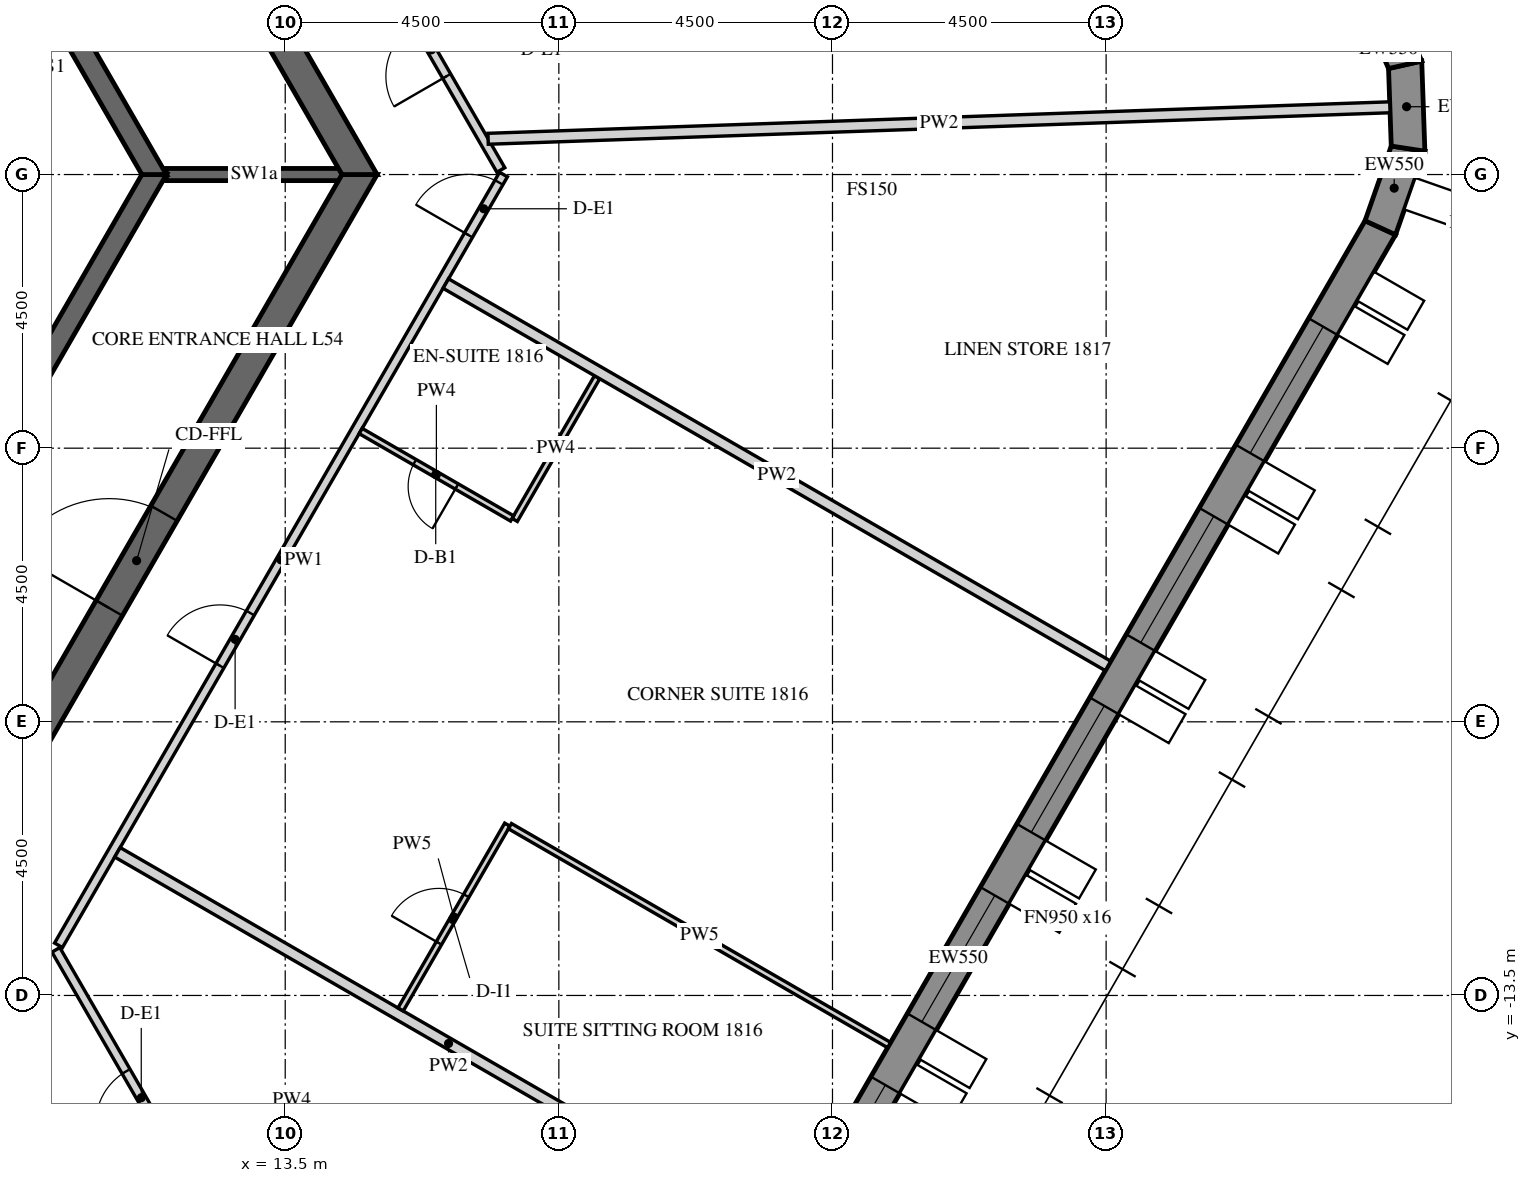
"""IFC4 building model, lengths in metres.
Left out: names, types, materials, properties, quantities, classifications, styles, units other than length and angle.
Written with IfcOpenShell. Run it as: python <this file> out.ifc"""

import sys

from ifc_helpers import new_model, si_unit, direction, frame, frame_2d, origin, place, context, subcontext, project, spatial, polyline, rectangle, outline, extrude, element, fill, save


model = new_model("IFC4")
c1 = context("Model", 3, precision=1e-05, world=origin(), true_north=direction((0.0, 1.0)))
c2 = subcontext(c1, "Body", "Model", "MODEL_VIEW")
j1 = project(units=[si_unit("LENGTHUNIT", "METRE"), si_unit("PLANEANGLEUNIT", "RADIAN")], contexts=[c1])
p1 = place(None, origin())
s1 = spatial("IfcSite", under=j1, at=p1, CompositionType="ELEMENT")
p2 = place(p1, origin())
s2 = spatial("IfcBuilding", under=s1, at=p2, CompositionType="ELEMENT")
p3 = place(p2, frame((0.0, 0.0, 226.8)))
s3 = spatial("IfcBuildingStorey", under=s2, at=p3, CompositionType="ELEMENT", Elevation=226.8)
p4 = place(p3, frame((17.63, -24.914, -0.15), z_axis=(0.0, 0.0, 1.0), x_axis=(0.499998569178, 0.866026229868, 0.0)))
e1 = element("IfcWall", 1, at=p4, inside=s3, PredefinedType="SOLIDWALL", context=c2, shape_type="SweptSolid", body=[
    extrude(outline(polyline([(-0.022, -0.275), (27.783, -0.275), (27.732, 0.275), (0.022, 0.275), (-0.022, -0.275)])), origin(), (0.0, 0.0, 1.0), 3.9),
])
p5 = place(p4, frame((1.879, 0.0, 1.05)))
e2 = element("IfcOpeningElement", 2, at=p5, cuts=e1, PredefinedType="OPENING", context=c2, shape_type="SweptSolid", body=[
    extrude(rectangle(XDim=2.4, YDim=2.4, at=frame_2d((1.2, 1.2))), frame((0.0, 0.285, 0.0), z_axis=(0.0, -1.0, 0.0), x_axis=(1.0, 0.0, 0.0)), (0.0, 0.0, 1.0), 0.57),
])
p6 = place(p4, frame((5.479, 0.0, 1.05)))
e3 = element("IfcOpeningElement", 3, at=p6, cuts=e1, PredefinedType="OPENING", context=c2, shape_type="SweptSolid", body=[
    extrude(rectangle(XDim=2.4, YDim=2.4, at=frame_2d((1.2, 1.2))), frame((0.0, 0.285, 0.0), z_axis=(0.0, -1.0, 0.0), x_axis=(1.0, 0.0, 0.0)), (0.0, 0.0, 1.0), 0.57),
])
p7 = place(p4, frame((9.079, 0.0, 1.05)))
e4 = element("IfcOpeningElement", 4, at=p7, cuts=e1, PredefinedType="OPENING", context=c2, shape_type="SweptSolid", body=[
    extrude(rectangle(XDim=2.4, YDim=2.4, at=frame_2d((1.2, 1.2))), frame((0.0, 0.285, 0.0), z_axis=(0.0, -1.0, 0.0), x_axis=(1.0, 0.0, 0.0)), (0.0, 0.0, 1.0), 0.57),
])
p8 = place(p4, frame((12.679, 0.0, 1.05)))
e5 = element("IfcOpeningElement", 5, at=p8, cuts=e1, PredefinedType="OPENING", context=c2, shape_type="SweptSolid", body=[
    extrude(rectangle(XDim=2.4, YDim=2.4, at=frame_2d((1.2, 1.2))), frame((0.0, 0.285, 0.0), z_axis=(0.0, -1.0, 0.0), x_axis=(1.0, 0.0, 0.0)), (0.0, 0.0, 1.0), 0.57),
])
p9 = place(p4, frame((16.279, 0.0, 1.05)))
e6 = element("IfcOpeningElement", 6, at=p9, cuts=e1, PredefinedType="OPENING", context=c2, shape_type="SweptSolid", body=[
    extrude(rectangle(XDim=2.4, YDim=2.4, at=frame_2d((1.2, 1.2))), frame((0.0, 0.285, 0.0), z_axis=(0.0, -1.0, 0.0), x_axis=(1.0, 0.0, 0.0)), (0.0, 0.0, 1.0), 0.57),
])
p10 = place(p4, frame((19.879, 0.0, 1.05)))
e7 = element("IfcOpeningElement", 7, at=p10, cuts=e1, PredefinedType="OPENING", context=c2, shape_type="SweptSolid", body=[
    extrude(rectangle(XDim=2.4, YDim=2.4, at=frame_2d((1.2, 1.2))), frame((0.0, 0.285, 0.0), z_axis=(0.0, -1.0, 0.0), x_axis=(1.0, 0.0, 0.0)), (0.0, 0.0, 1.0), 0.57),
])
p11 = place(p4, frame((23.479, 0.0, 1.05)))
e8 = element("IfcOpeningElement", 8, at=p11, cuts=e1, PredefinedType="OPENING", context=c2, shape_type="SweptSolid", body=[
    extrude(rectangle(XDim=2.4, YDim=2.4, at=frame_2d((1.2, 1.2))), frame((0.0, 0.285, 0.0), z_axis=(0.0, -1.0, 0.0), x_axis=(1.0, 0.0, 0.0)), (0.0, 0.0, 1.0), 0.57),
])
p12 = place(p3, frame((31.509, -0.875, -0.15), z_axis=(0.0, 0.0, 1.0), x_axis=(0.33111537203, 0.943590276765, 0.0)))
e9 = element("IfcWall", 9, at=p12, inside=s3, PredefinedType="SOLIDWALL", context=c2, shape_type="SweptSolid", body=[
    extrude(outline(polyline([(-0.026, -0.275), (1.431, -0.275), (1.327, 0.275), (0.026, 0.275), (-0.026, -0.275)])), origin(), (0.0, 0.0, 1.0), 3.9),
])
p13 = place(p3, frame((31.966, 0.426, -0.15), z_axis=(0.0, 0.0, 1.0), x_axis=(-0.034876908462, 0.999391615562, 0.0)))
e10 = element("IfcWall", 10, at=p13, inside=s3, PredefinedType="SOLIDWALL", context=c2, shape_type="SweptSolid", body=[
    extrude(outline(polyline([(-0.052, -0.275), (1.431, -0.275), (1.327, 0.275), (0.052, 0.275), (-0.052, -0.275)])), origin(), (0.0, 0.0, 1.0), 3.9),
])
p14 = place(p3, frame((31.917, 1.804, -0.15), z_axis=(0.0, 0.0, 1.0), x_axis=(-0.396225741392, 0.918153125496, 0.0)))
e11 = element("IfcWall", 11, at=p14, inside=s3, PredefinedType="SOLIDWALL", context=c2, shape_type="SweptSolid", body=[
    extrude(outline(polyline([(-0.052, -0.275), (1.405, -0.275), (1.353, 0.275), (0.052, 0.275), (-0.052, -0.275)])), origin(), (0.0, 0.0, 1.0), 3.9),
])
p15 = place(p3, frame((7.361, -12.75, -0.15), z_axis=(0.0, 0.0, 1.0), x_axis=(0.50000571537, 0.866022103989, 0.0)))
e12 = element("IfcWall", 12, at=p15, inside=s3, PredefinedType="SHEAR", context=c2, shape_type="SweptSolid", body=[
    extrude(outline(polyline([(-0.144, -0.25), (14.867, -0.25), (14.578, 0.25), (0.144, 0.25), (-0.144, -0.25)])), origin(), (0.0, 0.0, 1.0), 3.9),
])
p16 = place(p15, frame((6.49, 0.0, 0.15)))
e13 = element("IfcOpeningElement", 13, at=p16, cuts=e12, PredefinedType="OPENING", context=c2, shape_type="SweptSolid", body=[
    extrude(rectangle(XDim=1.8, YDim=2.4, at=frame_2d((0.9, 1.2))), frame((0.0, 0.26, 0.0), z_axis=(0.0, -1.0, 0.0), x_axis=(1.0, 0.0, 0.0)), (0.0, 0.0, 1.0), 0.52),
])
p17 = place(p3, frame((14.722, 0.0, -0.15), z_axis=(0.0, 0.0, 1.0), x_axis=(-0.50000571537, 0.866022103989, 0.0)))
e14 = element("IfcWall", 14, at=p17, inside=s3, PredefinedType="SHEAR", context=c2, shape_type="SweptSolid", body=[
    extrude(outline(polyline([(-0.144, -0.25), (14.867, -0.25), (14.578, 0.25), (0.144, 0.25), (-0.144, -0.25)])), origin(), (0.0, 0.0, 1.0), 3.9),
])
p18 = place(p17, frame((6.432, 0.0, 0.15)))
e15 = element("IfcOpeningElement", 15, at=p18, cuts=e14, PredefinedType="OPENING", context=c2, shape_type="SweptSolid", body=[
    extrude(rectangle(XDim=1.8, YDim=2.4, at=frame_2d((0.9, 1.2))), frame((0.0, 0.26, 0.0), z_axis=(0.0, -1.0, 0.0), x_axis=(1.0, 0.0, 0.0)), (0.0, 0.0, 1.0), 0.52),
])
p19 = place(p3, frame((7.506, -13.0, -0.15), z_axis=(0.0, 0.0, 1.0), x_axis=(0.499988271576, -0.866032175087, 0.0)))
e16 = element("IfcWall", 16, at=p19, inside=s3, PredefinedType="SHEAR", context=c2, shape_type="SweptSolid", body=[
    extrude(rectangle(XDim=15.424, YDim=0.5, at=frame_2d((7.712, 0.0))), origin(), (0.0, 0.0, 1.0), 3.9),
])
p20 = place(p19, frame((6.812, 0.0, 0.15)))
e17 = element("IfcOpeningElement", 17, at=p20, cuts=e16, PredefinedType="OPENING", context=c2, shape_type="SweptSolid", body=[
    extrude(rectangle(XDim=1.8, YDim=2.4, at=frame_2d((0.9, 1.2))), frame((0.0, 0.26, 0.0), z_axis=(0.0, -1.0, 0.0), x_axis=(1.0, 0.0, 0.0)), (0.0, 0.0, 1.0), 0.52),
])
p21 = place(p3, frame((5.673, -9.825, -0.15), z_axis=(0.0, 0.0, 1.0), x_axis=(0.499995046907, 0.866028263435, 0.0)))
e18 = element("IfcWall", 18, at=p21, inside=s3, PredefinedType="SHEAR", context=c2, shape_type="SweptSolid", body=[
    extrude(outline(polyline([(-0.101, -0.175), (11.446, -0.175), (11.244, 0.175), (0.101, 0.175), (-0.101, -0.175)])), origin(), (0.0, 0.0, 1.0), 3.9),
])
p22 = place(p21, frame((4.801, 0.0, 0.15)))
e19 = element("IfcOpeningElement", 19, at=p22, cuts=e18, PredefinedType="OPENING", context=c2, shape_type="SweptSolid", body=[
    extrude(rectangle(XDim=1.8, YDim=2.4, at=frame_2d((0.9, 1.2))), frame((0.0, 0.185, 0.0), z_axis=(0.0, -1.0, 0.0), x_axis=(1.0, 0.0, 0.0)), (0.0, 0.0, 1.0), 0.37),
])
p23 = place(p3, frame((11.345, 0.0, -0.15), z_axis=(0.0, 0.0, 1.0), x_axis=(-0.499995046907, 0.866028263435, 0.0)))
e20 = element("IfcWall", 20, at=p23, inside=s3, PredefinedType="SHEAR", context=c2, shape_type="SweptSolid", body=[
    extrude(outline(polyline([(-0.101, -0.175), (11.446, -0.175), (11.244, 0.175), (0.101, 0.175), (-0.101, -0.175)])), origin(), (0.0, 0.0, 1.0), 3.9),
])
p24 = place(p23, frame((4.744, 0.0, 0.15)))
e21 = element("IfcOpeningElement", 21, at=p24, cuts=e20, PredefinedType="OPENING", context=c2, shape_type="SweptSolid", body=[
    extrude(rectangle(XDim=1.8, YDim=2.4, at=frame_2d((0.9, 1.2))), frame((0.0, 0.185, 0.0), z_axis=(0.0, -1.0, 0.0), x_axis=(1.0, 0.0, 0.0)), (0.0, 0.0, 1.0), 0.37),
])
p25 = place(p3, frame((11.547, 0.0, -0.15), z_axis=(0.0, 0.0, 1.0), x_axis=(1.0, 0.0, 0.0)))
e22 = element("IfcWall", 22, at=p25, inside=s3, PredefinedType="SHEAR", context=c2, shape_type="SweptSolid", body=[
    extrude(rectangle(XDim=2.887, YDim=0.2, at=frame_2d((1.443, 0.0))), origin(), (0.0, 0.0, 1.0), 3.9),
])
p26 = place(p3, frame((6.221, -14.875, 0.0), z_axis=(0.0, 0.0, 1.0), x_axis=(0.499989830942, -0.866031274813, 0.0)))
e23 = element("IfcWall", 23, at=p26, inside=s3, PredefinedType="PARTITIONING", context=c2, shape_type="SweptSolid", body=[
    extrude(rectangle(XDim=7.93, YDim=0.15, at=frame_2d((3.965, 0.0))), origin(), (0.0, 0.0, 1.0), 2.988),
])
p27 = place(p26, frame((2.552, 0.0, 0.0)))
e24 = element("IfcOpeningElement", 24, at=p27, cuts=e23, PredefinedType="OPENING", context=c2, shape_type="SweptSolid", body=[
    extrude(rectangle(XDim=1.0, YDim=2.1, at=frame_2d((0.5, 1.05))), frame((0.0, 0.085, 0.0), z_axis=(0.0, -1.0, 0.0), x_axis=(1.0, 0.0, 0.0)), (0.0, 0.0, 1.0), 0.17),
])
p28 = place(p3, frame((13.699, -19.628, 0.0), z_axis=(0.0, 0.0, 1.0), x_axis=(-0.499997422768, 0.866026891745, 0.0)))
e25 = element("IfcWall", 25, at=p28, inside=s3, PredefinedType="PARTITIONING", context=c2, shape_type="SweptSolid", body=[
    extrude(rectangle(XDim=7.942, YDim=0.15, at=frame_2d((3.971, 0.0))), origin(), (0.0, 0.0, 1.0), 2.988),
])
p29 = place(p28, frame((4.634, 0.0, 0.0)))
e26 = element("IfcOpeningElement", 26, at=p29, cuts=e25, PredefinedType="OPENING", context=c2, shape_type="SweptSolid", body=[
    extrude(rectangle(XDim=1.0, YDim=2.1, at=frame_2d((0.5, 1.05))), frame((0.0, 0.085, 0.0), z_axis=(0.0, -1.0, 0.0), x_axis=(1.0, 0.0, 0.0)), (0.0, 0.0, 1.0), 0.17),
])
p30 = place(p3, frame((9.772, -12.675, 0.0), z_axis=(0.0, 0.0, 1.0), x_axis=(0.499996322767, 0.866027526826, 0.0)))
e27 = element("IfcWall", 27, at=p30, inside=s3, PredefinedType="PARTITIONING", context=c2, shape_type="SweptSolid", body=[
    extrude(rectangle(XDim=14.636, YDim=0.15, at=frame_2d((7.318, 0.0))), origin(), (0.0, 0.0, 1.0), 2.988),
])
p31 = place(p30, frame((5.309, 0.0, 0.0)))
e28 = element("IfcOpeningElement", 28, at=p31, cuts=e27, PredefinedType="OPENING", context=c2, shape_type="SweptSolid", body=[
    extrude(rectangle(XDim=1.0, YDim=2.1, at=frame_2d((0.5, 1.05))), frame((0.0, 0.085, 0.0), z_axis=(0.0, -1.0, 0.0), x_axis=(1.0, 0.0, 0.0)), (0.0, 0.0, 1.0), 0.17),
])
p32 = place(p30, frame((13.486, 0.0, 0.0)))
e29 = element("IfcOpeningElement", 29, at=p32, cuts=e27, PredefinedType="OPENING", context=c2, shape_type="SweptSolid", body=[
    extrude(rectangle(XDim=1.0, YDim=2.1, at=frame_2d((0.5, 1.05))), frame((0.0, 0.085, 0.0), z_axis=(0.0, -1.0, 0.0), x_axis=(1.0, 0.0, 0.0)), (0.0, 0.0, 1.0), 0.17),
])
p33 = place(p3, frame((17.046, 0.075, 0.0), z_axis=(0.0, 0.0, 1.0), x_axis=(-0.499996322767, 0.866027526826, 0.0)))
e30 = element("IfcWall", 30, at=p33, inside=s3, PredefinedType="PARTITIONING", context=c2, shape_type="SweptSolid", body=[
    extrude(rectangle(XDim=14.636, YDim=0.15, at=frame_2d((7.318, 0.0))), origin(), (0.0, 0.0, 1.0), 2.988),
])
p34 = place(p33, frame((1.781, 0.0, 0.0)))
e31 = element("IfcOpeningElement", 31, at=p34, cuts=e30, PredefinedType="OPENING", context=c2, shape_type="SweptSolid", body=[
    extrude(rectangle(XDim=1.0, YDim=2.1, at=frame_2d((0.5, 1.05))), frame((0.0, 0.085, 0.0), z_axis=(0.0, -1.0, 0.0), x_axis=(1.0, 0.0, 0.0)), (0.0, 0.0, 1.0), 0.17),
])
p35 = place(p33, frame((7.872, 0.0, 0.0)))
e32 = element("IfcOpeningElement", 32, at=p35, cuts=e30, PredefinedType="OPENING", context=c2, shape_type="SweptSolid", body=[
    extrude(rectangle(XDim=1.0, YDim=2.1, at=frame_2d((0.5, 1.05))), frame((0.0, 0.085, 0.0), z_axis=(0.0, -1.0, 0.0), x_axis=(1.0, 0.0, 0.0)), (0.0, 0.0, 1.0), 0.17),
])
p36 = place(p33, frame((13.203, 0.0, 0.0)))
e33 = element("IfcOpeningElement", 33, at=p36, cuts=e30, PredefinedType="OPENING", context=c2, shape_type="SweptSolid", body=[
    extrude(rectangle(XDim=1.0, YDim=2.1, at=frame_2d((0.5, 1.05))), frame((0.0, 0.085, 0.0), z_axis=(0.0, -1.0, 0.0), x_axis=(1.0, 0.0, 0.0)), (0.0, 0.0, 1.0), 0.17),
])
p37 = place(p3, frame((21.631, -17.433, 0.0), z_axis=(0.0, 0.0, 1.0), x_axis=(-0.866032662629, 0.499987427101, 0.0)))
e34 = element("IfcWall", 34, at=p37, inside=s3, PredefinedType="PARTITIONING", context=c2, shape_type="SweptSolid", body=[
    extrude(rectangle(XDim=12.575, YDim=0.18, at=frame_2d((6.288, 0.0))), origin(), (0.0, 0.0, 1.0), 2.988),
])
p38 = place(p3, frame((18.629, -3.333, 0.0), z_axis=(0.0, 0.0, 1.0), x_axis=(-0.499995396135, -0.866028061811, 0.0)))
e35 = element("IfcWall", 35, at=p38, inside=s3, PredefinedType="PARTITIONING", context=c2, shape_type="SweptSolid", body=[
    extrude(rectangle(XDim=2.71, YDim=0.1, at=frame_2d((1.355, 0.0))), origin(), (0.0, 0.0, 1.0), 2.988),
])
p39 = place(p3, frame((17.231, -5.655, 0.0), z_axis=(0.0, 0.0, 1.0), x_axis=(-0.866039941686, 0.499974818771, 0.0)))
e36 = element("IfcWall", 36, at=p39, inside=s3, PredefinedType="PARTITIONING", context=c2, shape_type="SweptSolid", body=[
    extrude(rectangle(XDim=2.875, YDim=0.1, at=frame_2d((1.438, 0.0))), origin(), (0.0, 0.0, 1.0), 2.988),
])
p40 = place(p39, frame((1.05, 0.0, 0.0)))
e37 = element("IfcOpeningElement", 37, at=p40, cuts=e36, PredefinedType="OPENING", context=c2, shape_type="SweptSolid", body=[
    extrude(rectangle(XDim=0.8, YDim=2.1, at=frame_2d((0.4, 1.05))), frame((0.0, 0.06, 0.0), z_axis=(0.0, -1.0, 0.0), x_axis=(1.0, 0.0, 0.0)), (0.0, 0.0, 1.0), 0.12),
])
p41 = place(p3, frame((15.398, -13.73, 0.0), z_axis=(0.0, 0.0, 1.0), x_axis=(0.499969314921, 0.866043119098, 0.0)))
e38 = element("IfcWall", 38, at=p41, inside=s3, PredefinedType="PARTITIONING", context=c2, shape_type="SweptSolid", body=[
    extrude(rectangle(XDim=3.51, YDim=0.1, at=frame_2d((1.755, 0.0))), origin(), (0.0, 0.0, 1.0), 2.988),
])
p42 = place(p41, frame((1.26, 0.0, 0.0)))
e39 = element("IfcOpeningElement", 39, at=p42, cuts=e38, PredefinedType="OPENING", context=c2, shape_type="SweptSolid", body=[
    extrude(rectangle(XDim=0.9, YDim=2.1, at=frame_2d((0.45, 1.05))), frame((0.0, 0.06, 0.0), z_axis=(0.0, -1.0, 0.0), x_axis=(1.0, 0.0, 0.0)), (0.0, 0.0, 1.0), 0.12),
])
p43 = place(p3, frame((17.196, -10.716, 0.0), z_axis=(0.0, 0.0, 1.0), x_axis=(0.866033125095, -0.499986626058, 0.0)))
e40 = element("IfcWall", 40, at=p43, inside=s3, PredefinedType="PARTITIONING", context=c2, shape_type="SweptSolid", body=[
    extrude(rectangle(XDim=7.2, YDim=0.1, at=frame_2d((3.6, 0.0))), origin(), (0.0, 0.0, 1.0), 2.988),
])
p44 = place(p3, frame((27.031, -8.08, 0.0), z_axis=(0.0, 0.0, 1.0), x_axis=(-0.86602780907, 0.499995833901, 0.0)))
e41 = element("IfcWall", 41, at=p44, inside=s3, PredefinedType="PARTITIONING", context=c2, shape_type="SweptSolid", body=[
    extrude(rectangle(XDim=12.575, YDim=0.18, at=frame_2d((6.287, 0.0))), origin(), (0.0, 0.0, 1.0), 2.988),
])
p45 = place(p3, frame((31.667, 1.106, 0.0), z_axis=(0.0, 0.0, 1.0), x_axis=(-0.999390937365, -0.034896336667, 0.0)))
e42 = element("IfcWall", 42, at=p45, inside=s3, PredefinedType="PARTITIONING", context=c2, shape_type="SweptSolid", body=[
    extrude(rectangle(XDim=14.839, YDim=0.18, at=frame_2d((7.419, 0.0))), origin(), (0.0, 0.0, 1.0), 2.988),
])
p46 = place(p7, frame((0.0, 0.205, 0.0)))
e43 = element("IfcWindow", 43, at=p46, inside=s3, PartitioningType="DOUBLE_PANEL_VERTICAL", PredefinedType="WINDOW", context=c2, shape_type="SweptSolid", body=[
    extrude(rectangle(XDim=2.4, YDim=2.4, at=frame_2d((1.2, 1.2))), frame((0.0, 0.03, 0.0), z_axis=(0.0, -1.0, 0.0), x_axis=(1.0, 0.0, 0.0)), (0.0, 0.0, 1.0), 0.06),
])
fill(e4, e43)
p47 = place(p8, frame((0.0, 0.205, 0.0)))
e44 = element("IfcWindow", 44, at=p47, inside=s3, PartitioningType="DOUBLE_PANEL_VERTICAL", PredefinedType="WINDOW", context=c2, shape_type="SweptSolid", body=[
    extrude(rectangle(XDim=2.4, YDim=2.4, at=frame_2d((1.2, 1.2))), frame((0.0, 0.03, 0.0), z_axis=(0.0, -1.0, 0.0), x_axis=(1.0, 0.0, 0.0)), (0.0, 0.0, 1.0), 0.06),
])
fill(e5, e44)
p48 = place(p9, frame((0.0, 0.205, 0.0)))
e45 = element("IfcWindow", 45, at=p48, inside=s3, PartitioningType="DOUBLE_PANEL_VERTICAL", PredefinedType="WINDOW", context=c2, shape_type="SweptSolid", body=[
    extrude(rectangle(XDim=2.4, YDim=2.4, at=frame_2d((1.2, 1.2))), frame((0.0, 0.03, 0.0), z_axis=(0.0, -1.0, 0.0), x_axis=(1.0, 0.0, 0.0)), (0.0, 0.0, 1.0), 0.06),
])
fill(e6, e45)
p49 = place(p10, frame((0.0, 0.205, 0.0)))
e46 = element("IfcWindow", 46, at=p49, inside=s3, PartitioningType="DOUBLE_PANEL_VERTICAL", PredefinedType="WINDOW", context=c2, shape_type="SweptSolid", body=[
    extrude(rectangle(XDim=2.4, YDim=2.4, at=frame_2d((1.2, 1.2))), frame((0.0, 0.03, 0.0), z_axis=(0.0, -1.0, 0.0), x_axis=(1.0, 0.0, 0.0)), (0.0, 0.0, 1.0), 0.06),
])
fill(e7, e46)
p50 = place(p11, frame((0.0, 0.205, 0.0)))
e47 = element("IfcWindow", 47, at=p50, inside=s3, PartitioningType="DOUBLE_PANEL_VERTICAL", PredefinedType="WINDOW", context=c2, shape_type="SweptSolid", body=[
    extrude(rectangle(XDim=2.4, YDim=2.4, at=frame_2d((1.2, 1.2))), frame((0.0, 0.03, 0.0), z_axis=(0.0, -1.0, 0.0), x_axis=(1.0, 0.0, 0.0)), (0.0, 0.0, 1.0), 0.06),
])
fill(e8, e47)
p51 = place(p16, origin())
e48 = element("IfcDoor", 48, at=p51, inside=s3, OperationType="DOUBLE_DOOR_SINGLE_SWING", PredefinedType="DOOR", context=c2, shape_type="SweptSolid", body=[
    extrude(rectangle(XDim=1.8, YDim=2.4, at=frame_2d((0.9, 1.2))), frame((0.0, 0.025, 0.0), z_axis=(0.0, -1.0, 0.0), x_axis=(1.0, 0.0, 0.0)), (0.0, 0.0, 1.0), 0.05),
])
fill(e13, e48)
p52 = place(p29, origin())
e49 = element("IfcDoor", 49, at=p52, inside=s3, OperationType="SINGLE_SWING_LEFT", PredefinedType="DOOR", context=c2, shape_type="SweptSolid", body=[
    extrude(rectangle(XDim=1.0, YDim=2.1, at=frame_2d((0.5, 1.05))), frame((0.0, 0.025, 0.0), z_axis=(0.0, -1.0, 0.0), x_axis=(1.0, 0.0, 0.0)), (0.0, 0.0, 1.0), 0.05),
])
fill(e26, e49)
p53 = place(p31, origin())
e50 = element("IfcDoor", 50, at=p53, inside=s3, OperationType="SINGLE_SWING_LEFT", PredefinedType="DOOR", context=c2, shape_type="SweptSolid", body=[
    extrude(rectangle(XDim=1.0, YDim=2.1, at=frame_2d((0.5, 1.05))), frame((0.0, 0.025, 0.0), z_axis=(0.0, -1.0, 0.0), x_axis=(1.0, 0.0, 0.0)), (0.0, 0.0, 1.0), 0.05),
])
fill(e28, e50)
p54 = place(p40, origin())
e51 = element("IfcDoor", 51, at=p54, inside=s3, OperationType="SINGLE_SWING_LEFT", PredefinedType="DOOR", context=c2, shape_type="SweptSolid", body=[
    extrude(rectangle(XDim=0.8, YDim=2.1, at=frame_2d((0.4, 1.05))), frame((0.0, 0.025, 0.0), z_axis=(0.0, -1.0, 0.0), x_axis=(1.0, 0.0, 0.0)), (0.0, 0.0, 1.0), 0.05),
])
fill(e37, e51)
p55 = place(p42, origin())
e52 = element("IfcDoor", 52, at=p55, inside=s3, OperationType="SINGLE_SWING_RIGHT", PredefinedType="DOOR", context=c2, shape_type="SweptSolid", body=[
    extrude(rectangle(XDim=0.9, YDim=2.1, at=frame_2d((0.45, 1.05))), frame((0.0, 0.025, 0.0), z_axis=(0.0, -1.0, 0.0), x_axis=(1.0, 0.0, 0.0)), (0.0, 0.0, 1.0), 0.05),
])
fill(e39, e52)
p56 = place(p32, origin())
e53 = element("IfcDoor", 53, at=p56, inside=s3, OperationType="SINGLE_SWING_LEFT", PredefinedType="DOOR", context=c2, shape_type="SweptSolid", body=[
    extrude(rectangle(XDim=1.0, YDim=2.1, at=frame_2d((0.5, 1.05))), frame((0.0, 0.025, 0.0), z_axis=(0.0, -1.0, 0.0), x_axis=(1.0, 0.0, 0.0)), (0.0, 0.0, 1.0), 0.05),
])
fill(e29, e53)
p57 = place(p34, origin())
e54 = element("IfcDoor", 54, at=p57, inside=s3, OperationType="SINGLE_SWING_LEFT", PredefinedType="DOOR", context=c2, shape_type="SweptSolid", body=[
    extrude(rectangle(XDim=1.0, YDim=2.1, at=frame_2d((0.5, 1.05))), frame((0.0, 0.025, 0.0), z_axis=(0.0, -1.0, 0.0), x_axis=(1.0, 0.0, 0.0)), (0.0, 0.0, 1.0), 0.05),
])
fill(e31, e54)
save(model, sys.argv[1])
